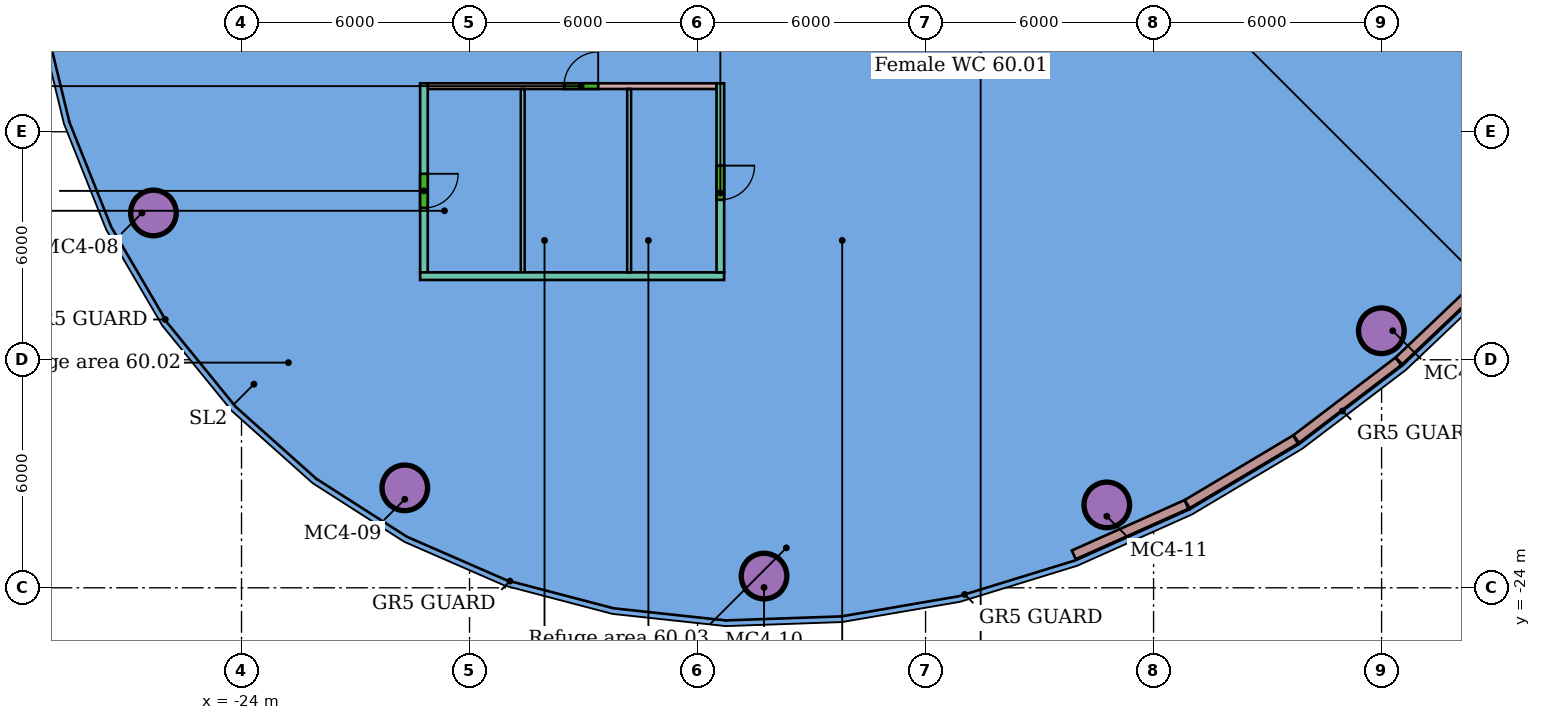
"""IFC4 building model, lengths in metres.
Left out: names, types, materials, properties, quantities, classifications, styles, units other than length and angle.
Written with IfcOpenShell. Run it as: python <this file> out.ifc"""

import sys

from ifc_helpers import new_model, si_unit, direction, frame, frame_2d, origin, origin_2d, place, context, subcontext, project, spatial, rectangle, hollow_circle, extrude, element, fill, save


model = new_model("IFC4")
c1 = context("Model", 3, precision=1e-05, world=origin(), true_north=direction((0.0, 1.0)))
c2 = subcontext(c1, "Body", "Model", "MODEL_VIEW")
j1 = project(units=[si_unit("LENGTHUNIT", "METRE"), si_unit("PLANEANGLEUNIT", "RADIAN")], contexts=[c1])
p1 = place(None, origin())
s1 = spatial("IfcSite", under=j1, at=p1, CompositionType="ELEMENT")
p2 = place(p1, origin())
s2 = spatial("IfcBuilding", under=s1, at=p2, CompositionType="ELEMENT")
p3 = place(p2, frame((0.0, 0.0, 242.5)))
s3 = spatial("IfcBuildingStorey", under=s2, at=p3, CompositionType="ELEMENT", Elevation=242.5)
for number, where, z_axis, x_axis in (
    (1, (-26.318, -14.137, 0.0), (0.0, 0.0, 1.0), (1.0, 0.0, 0.0)),
    (2, (-19.704, -21.37, 0.0), (0.0, 0.0, 1.0), (1.0, 0.0, 0.0)),
    (3, (-10.25, -23.691, 0.0), (0.0, 0.0, 1.0), (1.0, 0.0, 0.0)),
    (4, (-1.231, -21.819, 0.0), (0.0, 0.0, 1.0), (1.0, 0.0, 0.0)),
    (5, (5.993, -17.237, 0.0), (0.0, 0.0, 1.0), (1.0, 0.0, 0.0)),
):
    element("IfcColumn", number, at=place(p3, frame(where, z_axis=z_axis, x_axis=x_axis)), inside=s3, PredefinedType="COLUMN", context=c2, shape_type="SweptSolid", body=[
        extrude(hollow_circle(Radius=0.6, WallThickness=0.045, at=origin_2d()), origin(), (0.0, 0.0, 1.0), 3.4),
    ])
p4 = place(p3, frame((-19.1, -10.8, 0.0), z_axis=(0.0, 0.0, 1.0), x_axis=(1.0, 0.0, 0.0)))
e6 = element("IfcWall", 6, at=p4, inside=s3, PredefinedType="PARTITIONING", context=c2, shape_type="SweptSolid", body=[
    extrude(rectangle(XDim=7.6, YDim=0.15, at=frame_2d((3.8, 0.0))), origin(), (0.0, 0.0, 1.0), 3.4),
])
p5 = place(p4, frame((3.586, 0.0, 0.0)))
e7 = element("IfcOpeningElement", 7, at=p5, cuts=e6, PredefinedType="OPENING", context=c2, shape_type="SweptSolid", body=[
    extrude(rectangle(XDim=0.9, YDim=2.1, at=frame_2d((0.45, 1.05))), frame((0.0, 0.085, 0.0), z_axis=(0.0, -1.0, 0.0), x_axis=(1.0, 0.0, 0.0)), (0.0, 0.0, 1.0), 0.17),
])
p6 = place(p3, frame((-16.6, -15.7, 0.0), z_axis=(0.0, 0.0, 1.0), x_axis=(0.0, 1.0, 0.0)))
e8 = element("IfcWall", 8, at=p6, inside=s3, PredefinedType="PARTITIONING", context=c2, shape_type="SweptSolid", body=[
    extrude(rectangle(XDim=4.825, YDim=0.1, at=frame_2d((2.413, 0.0))), origin(), (0.0, 0.0, 1.0), 3.4),
])
p7 = place(p3, frame((-19.2, -10.725, 0.0), z_axis=(0.0, 0.0, 1.0), x_axis=(0.0, -1.0, 0.0)))
e9 = element("IfcWall", 9, at=p7, inside=s3, PredefinedType="PARTITIONING", context=c2, shape_type="SweptSolid", body=[
    extrude(rectangle(XDim=4.975, YDim=0.2, at=frame_2d((2.487, 0.0))), origin(), (0.0, 0.0, 1.0), 3.4),
])
p8 = place(p7, frame((2.382, 0.0, 0.0)))
e10 = element("IfcOpeningElement", 10, at=p8, cuts=e9, PredefinedType="OPENING", context=c2, shape_type="SweptSolid", body=[
    extrude(rectangle(XDim=0.9, YDim=2.1, at=frame_2d((0.45, 1.05))), frame((0.0, 0.11, 0.0), z_axis=(0.0, -1.0, 0.0), x_axis=(1.0, 0.0, 0.0)), (0.0, 0.0, 1.0), 0.22),
])
p9 = place(p3, frame((-19.3, -15.8, 0.0), z_axis=(0.0, 0.0, 1.0), x_axis=(1.0, 0.0, 0.0)))
e11 = element("IfcWall", 11, at=p9, inside=s3, PredefinedType="PARTITIONING", context=c2, shape_type="SweptSolid", body=[
    extrude(rectangle(XDim=8.0, YDim=0.2, at=frame_2d((4.0, 0.0))), origin(), (0.0, 0.0, 1.0), 3.4),
])
p10 = place(p3, frame((-13.8, -15.7, 0.0), z_axis=(0.0, 0.0, 1.0), x_axis=(0.0, 1.0, 0.0)))
e12 = element("IfcWall", 12, at=p10, inside=s3, PredefinedType="PARTITIONING", context=c2, shape_type="SweptSolid", body=[
    extrude(rectangle(XDim=4.825, YDim=0.1, at=frame_2d((2.413, 0.0))), origin(), (0.0, 0.0, 1.0), 3.4),
])
p11 = place(p3, frame((-11.4, -10.725, 0.0), z_axis=(0.0, 0.0, 1.0), x_axis=(0.0, -1.0, 0.0)))
e13 = element("IfcWall", 13, at=p11, inside=s3, PredefinedType="PARTITIONING", context=c2, shape_type="SweptSolid", body=[
    extrude(rectangle(XDim=4.975, YDim=0.2, at=frame_2d((2.487, 0.0))), origin(), (0.0, 0.0, 1.0), 3.4),
])
p12 = place(p11, frame((2.167, 0.0, 0.0)))
e14 = element("IfcOpeningElement", 14, at=p12, cuts=e13, PredefinedType="OPENING", context=c2, shape_type="SweptSolid", body=[
    extrude(rectangle(XDim=0.9, YDim=2.1, at=frame_2d((0.45, 1.05))), frame((0.0, 0.11, 0.0), z_axis=(0.0, -1.0, 0.0), x_axis=(1.0, 0.0, 0.0)), (0.0, 0.0, 1.0), 0.22),
])
p13 = place(p3, frame((-2.1, -23.133, 0.0), z_axis=(0.0, 0.0, 1.0), x_axis=(0.912863949032, 0.40826389818, 0.0)))
e15 = element("IfcWall", 15, at=p13, inside=s3, PredefinedType="SOLIDWALL", context=c2, shape_type="SweptSolid", body=[
    extrude(rectangle(XDim=3.249, YDim=0.25, at=frame_2d((1.625, 0.0))), origin(), (0.0, 0.0, 1.0), 3.05),
])
p14 = place(p3, frame((0.886, -21.796, 0.0), z_axis=(0.0, 0.0, 1.0), x_axis=(0.858982444498, 0.51200503908, 0.0)))
e16 = element("IfcWall", 16, at=p14, inside=s3, PredefinedType="SOLIDWALL", context=c2, shape_type="SweptSolid", body=[
    extrude(rectangle(XDim=3.318, YDim=0.25, at=frame_2d((1.659, 0.0))), origin(), (0.0, 0.0, 1.0), 3.05),
])
p15 = place(p3, frame((3.754, -20.085, 0.0), z_axis=(0.0, 0.0, 1.0), x_axis=(0.795944646333, 0.60536940786, 0.0)))
e17 = element("IfcWall", 17, at=p15, inside=s3, PredefinedType="SOLIDWALL", context=c2, shape_type="SweptSolid", body=[
    extrude(rectangle(XDim=3.374, YDim=0.25, at=frame_2d((1.687, 0.0))), origin(), (0.0, 0.0, 1.0), 3.05),
])
p16 = place(p3, frame((6.457, -18.028, 0.0), z_axis=(0.0, 0.0, 1.0), x_axis=(0.72490298549, 0.688850972002, 0.0)))
e18 = element("IfcWall", 18, at=p16, inside=s3, PredefinedType="SOLIDWALL", context=c2, shape_type="SweptSolid", body=[
    extrude(rectangle(XDim=3.413, YDim=0.25, at=frame_2d((1.707, 0.0))), origin(), (0.0, 0.0, 1.0), 3.05),
])
p17 = place(p5, origin())
e19 = element("IfcDoor", 19, at=p17, inside=s3, OperationType="SINGLE_SWING_RIGHT", PredefinedType="DOOR", context=c2, shape_type="SweptSolid", body=[
    extrude(rectangle(XDim=0.9, YDim=2.1, at=frame_2d((0.45, 1.05))), frame((0.0, 0.025, 0.0), z_axis=(0.0, -1.0, 0.0), x_axis=(1.0, 0.0, 0.0)), (0.0, 0.0, 1.0), 0.05),
])
fill(e7, e19)
p18 = place(p8, origin())
e20 = element("IfcDoor", 20, at=p18, inside=s3, OperationType="SINGLE_SWING_LEFT", PredefinedType="DOOR", context=c2, shape_type="SweptSolid", body=[
    extrude(rectangle(XDim=0.9, YDim=2.1, at=frame_2d((0.45, 1.05))), frame((0.0, 0.025, 0.0), z_axis=(0.0, -1.0, 0.0), x_axis=(1.0, 0.0, 0.0)), (0.0, 0.0, 1.0), 0.05),
])
fill(e10, e20)
p19 = place(p12, origin())
e21 = element("IfcDoor", 21, at=p19, inside=s3, OperationType="SINGLE_SWING_LEFT", PredefinedType="DOOR", context=c2, shape_type="SweptSolid", body=[
    extrude(rectangle(XDim=0.9, YDim=2.1, at=frame_2d((0.45, 1.05))), frame((0.0, 0.025, 0.0), z_axis=(0.0, -1.0, 0.0), x_axis=(1.0, 0.0, 0.0)), (0.0, 0.0, 1.0), 0.05),
])
fill(e14, e21)
save(model, sys.argv[1])
